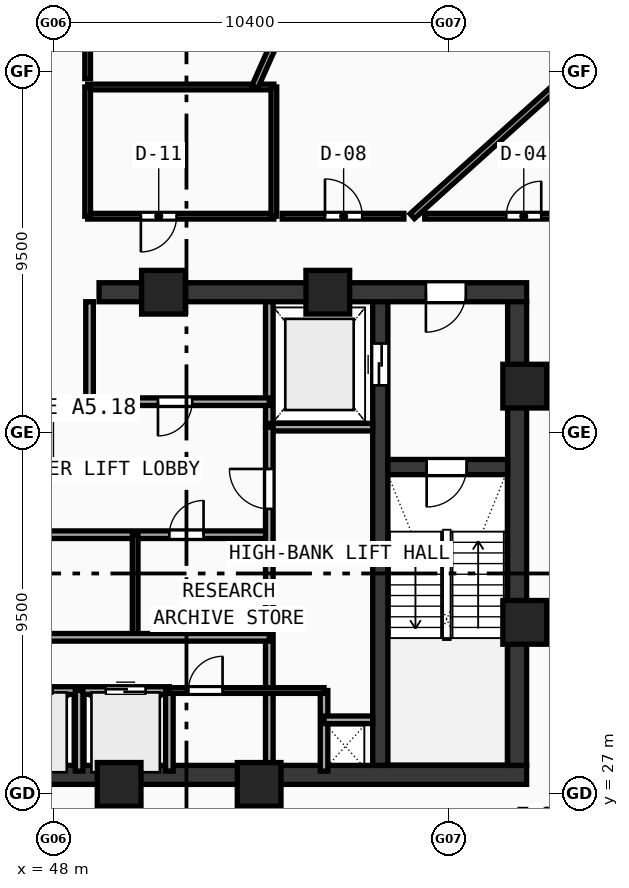
"""IFC4 building model, lengths in metres.
Left out: names, types, materials, properties, quantities, classifications, styles, units other than length and angle.
Written with IfcOpenShell. Run it as: python <this file> out.ifc"""

import sys

from ifc_helpers import new_model, si_unit, direction, frame, frame_2d, origin, origin_with_axes, origin_2d, place, context, subcontext, project, spatial, rectangle, hollow_rectangle, extrude, source, transform, mapped, element, fill, save


model = new_model("IFC4")
c1 = context("Model", 3, precision=1e-05, world=origin(), true_north=direction((0.0, 1.0)))
c2 = subcontext(c1, "Body", "Model", "MODEL_VIEW")
j1 = project(units=[si_unit("LENGTHUNIT", "METRE"), si_unit("PLANEANGLEUNIT", "RADIAN")], contexts=[c1])
p1 = place(None, origin())
s1 = spatial("IfcSite", under=j1, at=p1, CompositionType="ELEMENT")
p2 = place(p1, origin())
s2 = spatial("IfcBuilding", under=s1, at=p2, CompositionType="ELEMENT")
p3 = place(p2, frame((0.0, 0.0, 277.56)))
s3 = spatial("IfcBuildingStorey", under=s2, at=p3, CompositionType="ELEMENT", Elevation=277.56)
p4 = place(p3, frame((35.55, 27.5, 0.0), z_axis=(0.0, 0.0, 1.0), x_axis=(1.0, 0.0, 0.0)))
e1 = element("IfcWall", 1, at=p4, inside=s3, PredefinedType="SHEAR", context=c2, shape_type="SweptSolid", body=[
    extrude(rectangle(XDim=24.9, YDim=0.5, at=frame_2d((12.45, 0.0))), origin(), (0.0, 0.0, 1.0), 3.47),
])
p5 = place(p3, frame((49.2, 40.2, 0.0), z_axis=(0.0, 0.0, 1.0), x_axis=(1.0, 0.0, 0.0)))
e2 = element("IfcWall", 2, at=p5, inside=s3, PredefinedType="SHEAR", context=c2, shape_type="SweptSolid", body=[
    extrude(rectangle(XDim=11.25, YDim=0.5, at=frame_2d((5.625, 0.0))), origin(), (0.0, 0.0, 1.0), 3.47),
])
p6 = place(p5, frame((8.6, 0.0, 0.0)))
e3 = element("IfcOpeningElement", 3, at=p6, cuts=e2, PredefinedType="OPENING", context=c2, shape_type="SweptSolid", body=[
    extrude(rectangle(XDim=1.05, YDim=2.1, at=frame_2d((0.525, 1.05))), frame((0.0, 0.26, 0.0), z_axis=(0.0, -1.0, 0.0), x_axis=(1.0, 0.0, 0.0)), (0.0, 0.0, 1.0), 0.52),
])
p7 = place(p3, frame((60.2, 27.75, 0.0), z_axis=(0.0, 0.0, 1.0), x_axis=(0.0, 1.0, 0.0)))
e4 = element("IfcWall", 4, at=p7, inside=s3, PredefinedType="SHEAR", context=c2, shape_type="SweptSolid", body=[
    extrude(rectangle(XDim=12.2, YDim=0.5, at=frame_2d((6.1, 0.0))), origin(), (0.0, 0.0, 1.0), 3.47),
])
p8 = place(p3, frame((56.6, 27.75, 0.0), z_axis=(0.0, 0.0, 1.0), x_axis=(0.0, 1.0, 0.0)))
e5 = element("IfcWall", 5, at=p8, inside=s3, PredefinedType="SHEAR", context=c2, shape_type="SweptSolid", body=[
    extrude(rectangle(XDim=12.2, YDim=0.4, at=frame_2d((6.1, 0.0))), origin(), (0.0, 0.0, 1.0), 3.47),
])
p9 = place(p8, frame((10.0, 0.0, 0.0)))
e6 = element("IfcOpeningElement", 6, at=p9, cuts=e5, PredefinedType="OPENING", context=c2, shape_type="SweptSolid", body=[
    extrude(rectangle(XDim=1.1, YDim=2.1, at=frame_2d((0.55, 1.05))), frame((0.0, 0.21, 0.0), z_axis=(0.0, -1.0, 0.0), x_axis=(1.0, 0.0, 0.0)), (0.0, 0.0, 1.0), 0.42),
])
p10 = place(p3, frame((56.8, 35.6, 0.0), z_axis=(0.0, 0.0, 1.0), x_axis=(1.0, 0.0, 0.0)))
e7 = element("IfcWall", 7, at=p10, inside=s3, PredefinedType="SHEAR", context=c2, shape_type="SweptSolid", body=[
    extrude(rectangle(XDim=3.15, YDim=0.4, at=frame_2d((1.575, 0.0))), origin(), (0.0, 0.0, 1.0), 3.47),
])
p11 = place(p10, frame((1.02, 0.0, 0.0)))
e8 = element("IfcOpeningElement", 8, at=p11, cuts=e7, PredefinedType="OPENING", context=c2, shape_type="SweptSolid", body=[
    extrude(rectangle(XDim=1.05, YDim=2.1, at=frame_2d((0.525, 1.05))), frame((0.0, 0.21, 0.0), z_axis=(0.0, -1.0, 0.0), x_axis=(1.0, 0.0, 0.0)), (0.0, 0.0, 1.0), 0.42),
])
m1 = source(origin(), c2, "Body", "SweptSolid", [
    extrude(hollow_rectangle(XDim=1.15, YDim=1.15, WallThickness=0.048, at=origin_2d()), origin(), (0.0, 0.0, 1.0), 3.73),
])
for number, where, z_axis, x_axis in (
    (9, (49.729, 27.25, -0.26), (0.0, 0.0, 1.0), (1.0, 0.0, 0.0)),
    (10, (53.412, 27.25, -0.26), (0.0, 0.0, 1.0), (1.0, 0.0, 0.0)),
    (11, (60.4, 31.513, -0.26), (0.0, 0.0, 1.0), (1.0, 0.0, 0.0)),
    (12, (60.4, 37.729, -0.26), (0.0, 0.0, 1.0), (1.0, 0.0, 0.0)),
    (13, (55.219, 40.2, -0.26), (0.0, 0.0, 1.0), (1.0, 0.0, 0.0)),
    (14, (50.894, 40.2, -0.26), (0.0, 0.0, 1.0), (1.0, 0.0, 0.0)),
):
    element("IfcColumn", number, at=place(p3, frame(where, z_axis=z_axis, x_axis=x_axis)), inside=s3, PredefinedType="COLUMN", context=c2, shape_type="MappedRepresentation", body=[
        mapped(m1, transform((0.0, 0.0, 0.0), scale=1.0)),
    ])
p12 = place(p3, frame((53.68, 36.65, 0.0), z_axis=(0.0, 0.0, 1.0), x_axis=(0.0, 1.0, 0.0)))
e15 = element("IfcWall", 15, at=p12, inside=s3, PredefinedType="SOLIDWALL", context=c2, shape_type="SweptSolid", body=[
    extrude(rectangle(XDim=3.3, YDim=0.2, at=frame_2d((1.65, 0.0))), origin(), (0.0, 0.0, 1.0), 3.47),
])
p13 = place(p3, frame((53.68, 36.65, 0.0), z_axis=(0.0, 0.0, 1.0), x_axis=(1.0, 0.0, 0.0)))
e16 = element("IfcWall", 16, at=p13, inside=s3, PredefinedType="SOLIDWALL", context=c2, shape_type="SweptSolid", body=[
    extrude(rectangle(XDim=2.72, YDim=0.2, at=frame_2d((1.36, 0.0))), origin(), (0.0, 0.0, 1.0), 3.47),
])
p14 = place(p3, frame((48.95, 37.32, 0.0), z_axis=(0.0, 0.0, 1.0), x_axis=(1.0, 0.0, 0.0)))
e17 = element("IfcWall", 17, at=p14, inside=s3, PredefinedType="SOLIDWALL", context=c2, shape_type="SweptSolid", body=[
    extrude(rectangle(XDim=4.73, YDim=0.2, at=frame_2d((2.365, 0.0))), origin(), (0.0, 0.0, 1.0), 3.47),
])
p15 = place(p14, frame((1.8, 0.0, 0.0)))
e18 = element("IfcOpeningElement", 18, at=p15, cuts=e17, PredefinedType="OPENING", context=c2, shape_type="SweptSolid", body=[
    extrude(rectangle(XDim=0.9, YDim=2.1, at=frame_2d((0.45, 1.05))), frame((0.0, 0.11, 0.0), z_axis=(0.0, -1.0, 0.0), x_axis=(1.0, 0.0, 0.0)), (0.0, 0.0, 1.0), 0.22),
])
p16 = place(p3, frame((48.95, 37.32, 0.0), z_axis=(0.0, 0.0, 1.0), x_axis=(0.0, 1.0, 0.0)))
e19 = element("IfcWall", 19, at=p16, inside=s3, PredefinedType="SOLIDWALL", context=c2, shape_type="SweptSolid", body=[
    extrude(rectangle(XDim=2.63, YDim=0.2, at=frame_2d((1.315, 0.0))), origin(), (0.0, 0.0, 1.0), 3.47),
])
p17 = place(p3, frame((43.85, 33.82, 0.0), z_axis=(0.0, 0.0, 1.0), x_axis=(1.0, 0.0, 0.0)))
e20 = element("IfcWall", 20, at=p17, inside=s3, PredefinedType="SOLIDWALL", context=c2, shape_type="SweptSolid", body=[
    extrude(rectangle(XDim=9.83, YDim=0.2, at=frame_2d((4.915, 0.0))), origin(), (0.0, 0.0, 1.0), 3.47),
])
p18 = place(p17, frame((1.2, 0.0, 0.0)))
e21 = element("IfcOpeningElement", 21, at=p18, cuts=e20, PredefinedType="OPENING", context=c2, shape_type="SweptSolid", body=[
    extrude(rectangle(XDim=0.9, YDim=2.1, at=frame_2d((0.45, 1.05))), frame((0.0, 0.11, 0.0), z_axis=(0.0, -1.0, 0.0), x_axis=(1.0, 0.0, 0.0)), (0.0, 0.0, 1.0), 0.22),
])
p19 = place(p17, frame((7.2, 0.0, 0.0)))
e22 = element("IfcOpeningElement", 22, at=p19, cuts=e20, PredefinedType="OPENING", context=c2, shape_type="SweptSolid", body=[
    extrude(rectangle(XDim=0.9, YDim=2.1, at=frame_2d((0.45, 1.05))), frame((0.0, 0.11, 0.0), z_axis=(0.0, -1.0, 0.0), x_axis=(1.0, 0.0, 0.0)), (0.0, 0.0, 1.0), 0.22),
])
p20 = place(p3, frame((53.68, 27.6, 0.0), z_axis=(0.0, 0.0, 1.0), x_axis=(0.0, 1.0, 0.0)))
e23 = element("IfcWall", 23, at=p20, inside=s3, PredefinedType="SOLIDWALL", context=c2, shape_type="SweptSolid", body=[
    extrude(rectangle(XDim=9.05, YDim=0.2, at=frame_2d((4.525, 0.0))), origin(), (0.0, 0.0, 1.0), 3.47),
])
p21 = place(p20, frame((6.9, 0.0, 0.0)))
e24 = element("IfcOpeningElement", 24, at=p21, cuts=e23, PredefinedType="OPENING", context=c2, shape_type="SweptSolid", body=[
    extrude(rectangle(XDim=1.05, YDim=2.1, at=frame_2d((0.525, 1.05))), frame((0.0, 0.11, 0.0), z_axis=(0.0, -1.0, 0.0), x_axis=(1.0, 0.0, 0.0)), (0.0, 0.0, 1.0), 0.22),
])
p22 = place(p3, frame((50.15, 31.12, 0.0), z_axis=(0.0, 0.0, 1.0), x_axis=(0.0, 1.0, 0.0)))
e25 = element("IfcWall", 25, at=p22, inside=s3, PredefinedType="PARTITIONING", context=c2, shape_type="SweptSolid", body=[
    extrude(rectangle(XDim=2.7, YDim=0.15, at=frame_2d((1.35, 0.0))), origin(), (0.0, 0.0, 1.0), 3.47),
])
p23 = place(p3, frame((43.85, 29.72, 0.0), z_axis=(0.0, 0.0, 1.0), x_axis=(1.0, 0.0, 0.0)))
e26 = element("IfcWall", 26, at=p23, inside=s3, PredefinedType="SOLIDWALL", context=c2, shape_type="SweptSolid", body=[
    extrude(rectangle(XDim=7.2, YDim=0.2, at=frame_2d((3.6, 0.0))), origin(), (0.0, 0.0, 1.0), 3.47),
])
p24 = place(p23, frame((0.625, 0.0, 0.0)))
e27 = element("IfcOpeningElement", 27, at=p24, cuts=e26, PredefinedType="OPENING", context=c2, shape_type="SweptSolid", body=[
    extrude(rectangle(XDim=1.05, YDim=2.1, at=frame_2d((0.525, 1.05))), frame((0.0, 0.11, 0.0), z_axis=(0.0, -1.0, 0.0), x_axis=(1.0, 0.0, 0.0)), (0.0, 0.0, 1.0), 0.22),
])
p25 = place(p23, frame((3.075, 0.0, 0.0)))
e28 = element("IfcOpeningElement", 28, at=p25, cuts=e26, PredefinedType="OPENING", context=c2, shape_type="SweptSolid", body=[
    extrude(rectangle(XDim=1.05, YDim=2.1, at=frame_2d((0.525, 1.05))), frame((0.0, 0.11, 0.0), z_axis=(0.0, -1.0, 0.0), x_axis=(1.0, 0.0, 0.0)), (0.0, 0.0, 1.0), 0.22),
])
p26 = place(p23, frame((5.525, 0.0, 0.0)))
e29 = element("IfcOpeningElement", 29, at=p26, cuts=e26, PredefinedType="OPENING", context=c2, shape_type="SweptSolid", body=[
    extrude(rectangle(XDim=1.05, YDim=2.1, at=frame_2d((0.525, 1.05))), frame((0.0, 0.11, 0.0), z_axis=(0.0, -1.0, 0.0), x_axis=(1.0, 0.0, 0.0)), (0.0, 0.0, 1.0), 0.22),
])
p27 = place(p3, frame((51.05, 27.6, 0.0), z_axis=(0.0, 0.0, 1.0), x_axis=(0.0, 1.0, 0.0)))
e30 = element("IfcWall", 30, at=p27, inside=s3, PredefinedType="SOLIDWALL", context=c2, shape_type="SweptSolid", body=[
    extrude(rectangle(XDim=2.12, YDim=0.2, at=frame_2d((1.06, 0.0))), origin(), (0.0, 0.0, 1.0), 3.47),
])
p28 = place(p3, frame((43.85, 31.12, 0.0), z_axis=(0.0, 0.0, 1.0), x_axis=(1.0, 0.0, 0.0)))
e31 = element("IfcWall", 31, at=p28, inside=s3, PredefinedType="SOLIDWALL", context=c2, shape_type="SweptSolid", body=[
    extrude(rectangle(XDim=9.83, YDim=0.2, at=frame_2d((4.915, 0.0))), origin(), (0.0, 0.0, 1.0), 3.47),
])
for number, where, z_axis, x_axis in (
    (32, (48.675, 27.6, 0.0), (0.0, 0.0, 1.0), (0.0, 1.0, 0.0)),
    (33, (55.12, 27.6, 0.0), (0.0, 0.0, 1.0), (0.0, 1.0, 0.0)),
):
    element("IfcWall", number, at=place(p3, frame(where, z_axis=z_axis, x_axis=x_axis)), inside=s3, PredefinedType="SOLIDWALL", context=c2, shape_type="SweptSolid", body=[
        extrude(rectangle(XDim=2.12, YDim=0.2, at=frame_2d((1.06, 0.0))), origin(), (0.0, 0.0, 1.0), 3.47),
    ])
p29 = place(p3, frame((55.12, 28.95, 0.0), z_axis=(0.0, 0.0, 1.0), x_axis=(1.0, 0.0, 0.0)))
e34 = element("IfcWall", 34, at=p29, inside=s3, PredefinedType="SOLIDWALL", context=c2, shape_type="SweptSolid", body=[
    extrude(rectangle(XDim=1.28, YDim=0.2, at=frame_2d((0.64, 0.0))), origin(), (0.0, 0.0, 1.0), 3.47),
])
p30 = place(p3, frame((51.05, 29.72, 0.0), z_axis=(0.0, 0.0, 1.0), x_axis=(1.0, 0.0, 0.0)))
e35 = element("IfcWall", 35, at=p30, inside=s3, PredefinedType="PARTITIONING", context=c2, shape_type="SweptSolid", body=[
    extrude(rectangle(XDim=4.07, YDim=0.15, at=frame_2d((2.035, 0.0))), origin(), (0.0, 0.0, 1.0), 3.47),
])
p31 = place(p30, frame((0.5, 0.0, 0.0)))
e36 = element("IfcOpeningElement", 36, at=p31, cuts=e35, PredefinedType="OPENING", context=c2, shape_type="SweptSolid", body=[
    extrude(rectangle(XDim=0.9, YDim=2.1, at=frame_2d((0.45, 1.05))), frame((0.0, 0.085, 0.0), z_axis=(0.0, -1.0, 0.0), x_axis=(1.0, 0.0, 0.0)), (0.0, 0.0, 1.0), 0.17),
])
p32 = place(p3, frame((48.9, 42.2, 0.0), z_axis=(0.0, 0.0, 1.0), x_axis=(1.0, 0.0, 0.0)))
e37 = element("IfcWall", 37, at=p32, inside=s3, PredefinedType="PARTITIONING", context=c2, shape_type="SweptSolid", body=[
    extrude(rectangle(XDim=4.9, YDim=0.15, at=frame_2d((2.45, 0.0))), origin(), (0.0, 0.0, 1.0), 2.87),
])
p33 = place(p32, frame((1.4, 0.0, 0.0)))
e38 = element("IfcOpeningElement", 38, at=p33, cuts=e37, PredefinedType="OPENING", context=c2, shape_type="SweptSolid", body=[
    extrude(rectangle(XDim=0.94, YDim=2.1, at=frame_2d((0.47, 1.05))), frame((0.0, 0.085, 0.0), z_axis=(0.0, -1.0, 0.0), x_axis=(1.0, 0.0, 0.0)), (0.0, 0.0, 1.0), 0.17),
])
p34 = place(p3, frame((48.9, 45.6, 0.0), z_axis=(0.0, 0.0, 1.0), x_axis=(1.0, 0.0, 0.0)))
e39 = element("IfcWall", 39, at=p34, inside=s3, PredefinedType="PARTITIONING", context=c2, shape_type="SweptSolid", body=[
    extrude(rectangle(XDim=4.9, YDim=0.15, at=frame_2d((2.45, 0.0))), origin(), (0.0, 0.0, 1.0), 2.87),
])
for number, where, z_axis, x_axis in (
    (40, (48.9, 42.2, 0.0), (0.0, 0.0, 1.0), (0.0, 1.0, 0.0)),
    (41, (53.8, 42.2, 0.0), (0.0, 0.0, 1.0), (0.0, 1.0, 0.0)),
):
    element("IfcWall", number, at=place(p3, frame(where, z_axis=z_axis, x_axis=x_axis)), inside=s3, PredefinedType="PARTITIONING", context=c2, shape_type="SweptSolid", body=[
        extrude(rectangle(XDim=3.4, YDim=0.15, at=frame_2d((1.7, 0.0))), origin(), (0.0, 0.0, 1.0), 3.47),
    ])
p35 = place(p3, frame((57.44, 42.2, 0.0), z_axis=(0.0, 0.0, 1.0), x_axis=(0.743145118403, 0.669130281032, 0.0)))
e42 = element("IfcWall", 42, at=p35, inside=s3, PredefinedType="PARTITIONING", context=c2, shape_type="SweptSolid", body=[
    extrude(rectangle(XDim=15.397, YDim=0.17, at=frame_2d((7.699, 0.0))), origin(), (0.0, 0.0, 1.0), 2.87),
])
p36 = place(p3, frame((53.298, 45.6, 0.0), z_axis=(0.0, 0.0, 1.0), x_axis=(0.406743072482, 0.91354259506, 0.0)))
e43 = element("IfcWall", 43, at=p36, inside=s3, PredefinedType="PARTITIONING", context=c2, shape_type="SweptSolid", body=[
    extrude(rectangle(XDim=20.191, YDim=0.17, at=frame_2d((10.096, 0.0))), origin(), (0.0, 0.0, 1.0), 2.87),
])
p37 = place(p3, frame((48.9, 52.5, 0.0), z_axis=(0.0, 0.0, 1.0), x_axis=(0.0, -1.0, 0.0)))
e44 = element("IfcWall", 44, at=p37, inside=s3, PredefinedType="PARTITIONING", context=c2, shape_type="SweptSolid", body=[
    extrude(rectangle(XDim=6.68, YDim=0.15, at=frame_2d((3.34, 0.0))), origin(), (0.0, 0.0, 1.0), 3.12),
])
p38 = place(p3, frame((54.02, 42.2, 0.0), z_axis=(0.0, 0.0, 1.0), x_axis=(1.0, 0.0, 0.0)))
e45 = element("IfcWall", 45, at=p38, inside=s3, PredefinedType="PARTITIONING", context=c2, shape_type="SweptSolid", body=[
    extrude(rectangle(XDim=3.2, YDim=0.15, at=frame_2d((1.6, 0.0))), origin(), (0.0, 0.0, 1.0), 2.87),
])
p39 = place(p38, frame((1.125, 0.0, 0.0)))
e46 = element("IfcOpeningElement", 46, at=p39, cuts=e45, PredefinedType="OPENING", context=c2, shape_type="SweptSolid", body=[
    extrude(rectangle(XDim=0.98, YDim=2.12, at=frame_2d((0.49, 1.06))), frame((0.0, 0.085, 0.0), z_axis=(0.0, -1.0, 0.0), x_axis=(1.0, 0.0, 0.0)), (0.0, 0.0, 1.0), 0.17),
])
p40 = place(p3, frame((57.769, 42.2, 0.0), z_axis=(0.0, 0.0, 1.0), x_axis=(1.0, 0.0, 0.0)))
e47 = element("IfcWall", 47, at=p40, inside=s3, PredefinedType="PARTITIONING", context=c2, shape_type="SweptSolid", body=[
    extrude(rectangle(XDim=5.081, YDim=0.15, at=frame_2d((2.541, 0.0))), origin(), (0.0, 0.0, 1.0), 3.12),
])
p41 = place(p40, frame((2.146, 0.0, 0.0)))
e48 = element("IfcOpeningElement", 48, at=p41, cuts=e47, PredefinedType="OPENING", context=c2, shape_type="SweptSolid", body=[
    extrude(rectangle(XDim=0.92, YDim=2.1, at=frame_2d((0.46, 1.05))), frame((0.0, 0.085, 0.0), z_axis=(0.0, -1.0, 0.0), x_axis=(1.0, 0.0, 0.0)), (0.0, 0.0, 1.0), 0.17),
])
m2 = source(origin(), c2, "Body", "SweptSolid", [
    extrude(rectangle(XDim=1.05, YDim=2.1, at=frame_2d((0.525, 1.05))), frame((0.0, 0.025, 0.0), z_axis=(0.0, -1.0, 0.0), x_axis=(1.0, 0.0, 0.0)), (0.0, 0.0, 1.0), 0.05),
])
p42 = place(p11, frame((1.05, 0.0, 0.0), z_axis=(0.0, 0.0, 1.0), x_axis=(-1.0, 0.0, 0.0)))
e49 = element("IfcDoor", 49, at=p42, inside=s3, OperationType="SINGLE_SWING_RIGHT", PredefinedType="DOOR", context=c2, shape_type="MappedRepresentation", body=[
    mapped(m2, transform((0.0, 0.0, 0.0), scale=1.0)),
])
fill(e8, e49)
p43 = place(p6, frame((1.05, 0.0, 0.0), z_axis=(0.0, 0.0, 1.0), x_axis=(-1.0, 0.0, 0.0)))
e50 = element("IfcDoor", 50, at=p43, inside=s3, OperationType="SINGLE_SWING_RIGHT", PredefinedType="DOOR", context=c2, shape_type="MappedRepresentation", body=[
    mapped(m2, transform((0.0, 0.0, 0.0), scale=1.0)),
])
fill(e3, e50)
m3 = source(origin(), c2, "Body", "SweptSolid", [
    extrude(rectangle(XDim=1.1, YDim=2.1, at=frame_2d((0.55, 1.05))), frame((0.0, 0.025, 0.0), z_axis=(0.0, -1.0, 0.0), x_axis=(1.0, 0.0, 0.0)), (0.0, 0.0, 1.0), 0.05),
])
p44 = place(p9, origin_with_axes())
e51 = element("IfcDoor", 51, at=p44, inside=s3, OperationType="DOUBLE_DOOR_SLIDING", PredefinedType="DOOR", context=c2, shape_type="MappedRepresentation", body=[
    mapped(m3, transform((0.0, 0.0, 0.0), scale=1.0)),
])
fill(e6, e51)
m4 = source(origin(), c2, "Body", "SweptSolid", [
    extrude(rectangle(XDim=0.9, YDim=2.1, at=frame_2d((0.45, 1.05))), frame((0.0, 0.025, 0.0), z_axis=(0.0, -1.0, 0.0), x_axis=(1.0, 0.0, 0.0)), (0.0, 0.0, 1.0), 0.05),
])
p45 = place(p15, frame((0.9, 0.0, 0.0), z_axis=(0.0, 0.0, 1.0), x_axis=(-1.0, 0.0, 0.0)))
e52 = element("IfcDoor", 52, at=p45, inside=s3, OperationType="SINGLE_SWING_RIGHT", PredefinedType="DOOR", context=c2, shape_type="MappedRepresentation", body=[
    mapped(m4, transform((0.0, 0.0, 0.0), scale=1.0)),
])
fill(e18, e52)
p46 = place(p19, origin_with_axes())
e53 = element("IfcDoor", 53, at=p46, inside=s3, OperationType="SINGLE_SWING_RIGHT", PredefinedType="DOOR", context=c2, shape_type="MappedRepresentation", body=[
    mapped(m4, transform((0.0, 0.0, 0.0), scale=1.0)),
])
fill(e22, e53)
p47 = place(p21, origin_with_axes())
e54 = element("IfcDoor", 54, at=p47, inside=s3, OperationType="SINGLE_SWING_RIGHT", PredefinedType="DOOR", context=c2, shape_type="MappedRepresentation", body=[
    mapped(m2, transform((0.0, 0.0, 0.0), scale=1.0)),
])
fill(e24, e54)
p48 = place(p26, origin_with_axes())
e55 = element("IfcDoor", 55, at=p48, inside=s3, OperationType="DOUBLE_DOOR_SLIDING", PredefinedType="DOOR", context=c2, shape_type="MappedRepresentation", body=[
    mapped(m2, transform((0.0, 0.0, 0.0), scale=1.0)),
])
fill(e29, e55)
p49 = place(p31, origin_with_axes())
e56 = element("IfcDoor", 56, at=p49, inside=s3, OperationType="SINGLE_SWING_RIGHT", PredefinedType="DOOR", context=c2, shape_type="MappedRepresentation", body=[
    mapped(m4, transform((0.0, 0.0, 0.0), scale=1.0)),
])
fill(e36, e56)
m5 = source(origin(), c2, "Body", "SweptSolid", [
    extrude(rectangle(XDim=0.94, YDim=2.1, at=frame_2d((0.47, 1.05))), frame((0.0, 0.025, 0.0), z_axis=(0.0, -1.0, 0.0), x_axis=(1.0, 0.0, 0.0)), (0.0, 0.0, 1.0), 0.05),
])
p50 = place(p33, frame((0.94, 0.0, 0.0), z_axis=(0.0, 0.0, 1.0), x_axis=(-1.0, 0.0, 0.0)))
e57 = element("IfcDoor", 57, at=p50, inside=s3, OperationType="SINGLE_SWING_RIGHT", PredefinedType="DOOR", context=c2, shape_type="MappedRepresentation", body=[
    mapped(m5, transform((0.0, 0.0, 0.0), scale=1.0)),
])
fill(e38, e57)
m6 = source(origin(), c2, "Body", "SweptSolid", [
    extrude(rectangle(XDim=0.92, YDim=2.1, at=frame_2d((0.46, 1.05))), frame((0.0, 0.025, 0.0), z_axis=(0.0, -1.0, 0.0), x_axis=(1.0, 0.0, 0.0)), (0.0, 0.0, 1.0), 0.05),
])
p51 = place(p41, origin_with_axes())
e58 = element("IfcDoor", 58, at=p51, inside=s3, OperationType="SINGLE_SWING_RIGHT", PredefinedType="DOOR", context=c2, shape_type="MappedRepresentation", body=[
    mapped(m6, transform((0.0, 0.0, 0.0), scale=1.0)),
])
fill(e48, e58)
m7 = source(origin(), c2, "Body", "SweptSolid", [
    extrude(rectangle(XDim=0.98, YDim=2.12, at=frame_2d((0.49, 1.06))), frame((0.0, 0.025, 0.0), z_axis=(0.0, -1.0, 0.0), x_axis=(1.0, 0.0, 0.0)), (0.0, 0.0, 1.0), 0.05),
])
p52 = place(p39, origin_with_axes())
e59 = element("IfcDoor", 59, at=p52, inside=s3, OperationType="SINGLE_SWING_LEFT", PredefinedType="DOOR", context=c2, shape_type="MappedRepresentation", body=[
    mapped(m7, transform((0.0, 0.0, 0.0), scale=1.0)),
])
fill(e46, e59)
save(model, sys.argv[1])
